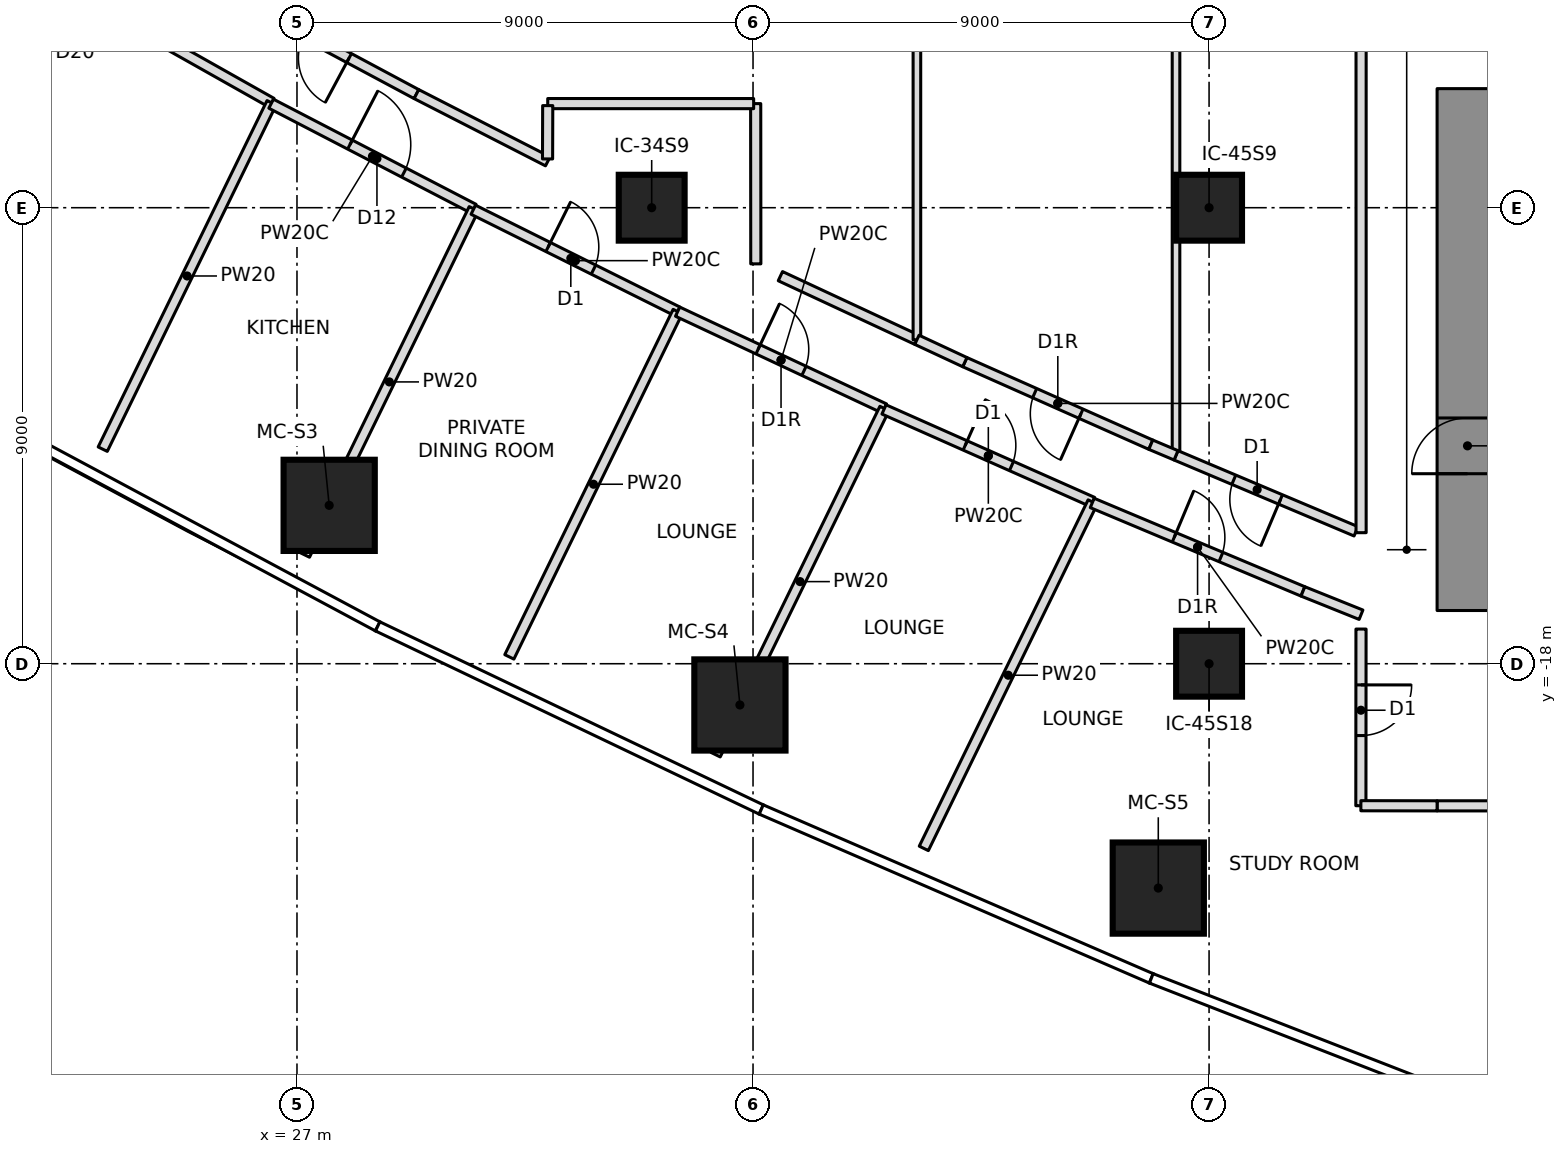
"""IFC4 building model, lengths in metres.
Left out: names, types, materials, properties, quantities, classifications, styles, units other than length and angle.
Written with IfcOpenShell. Run it as: python <this file> out.ifc"""

import sys

from ifc_helpers import new_model, si_unit, direction, frame, frame_2d, origin, origin_2d, place, context, subcontext, project, spatial, rectangle, extrude, element, fill, save


model = new_model("IFC4")
c1 = context("Model", 3, precision=1e-05, world=origin(), true_north=direction((0.0, 1.0)))
c2 = subcontext(c1, "Body", "Model", "MODEL_VIEW")
j1 = project(units=[si_unit("LENGTHUNIT", "METRE"), si_unit("PLANEANGLEUNIT", "RADIAN")], contexts=[c1])
p1 = place(None, origin())
s1 = spatial("IfcSite", under=j1, at=p1, CompositionType="ELEMENT")
p2 = place(p1, origin())
s2 = spatial("IfcBuilding", under=s1, at=p2, CompositionType="ELEMENT")
p3 = place(p2, frame((0.0, 0.0, 35.0)))
s3 = spatial("IfcBuildingStorey", under=s2, at=p3, CompositionType="ELEMENT", Elevation=35.0)
p4 = place(p3, frame((50.1, -16.95, 0.0), z_axis=(0.0, 0.0, 1.0), x_axis=(0.0, 1.0, 0.0)))
e1 = element("IfcWall", 1, at=p4, inside=s3, PredefinedType="SHEAR", context=c2, shape_type="SweptSolid", body=[
    extrude(rectangle(XDim=10.3, YDim=1.2, at=frame_2d((5.15, 0.0))), origin(), (0.0, 0.0, 1.0), 4.6),
])
p5 = place(p4, frame((2.7, 0.0, 0.0)))
e2 = element("IfcOpeningElement", 2, at=p5, cuts=e1, PredefinedType="OPENING", context=c2, shape_type="SweptSolid", body=[
    extrude(rectangle(XDim=1.1, YDim=2.1, at=frame_2d((0.55, 1.05))), frame((0.0, 0.61, 0.0), z_axis=(0.0, -1.0, 0.0), x_axis=(1.0, 0.0, 0.0)), (0.0, 0.0, 1.0), 1.22),
])
for number, where, z_axis, x_axis in (
    (3, (27.635, -14.874, 0.0), (0.0, 0.0, 1.0), (1.0, 0.0, 0.0)),
    (4, (35.741, -18.814, 0.0), (0.0, 0.0, 1.0), (1.0, 0.0, 0.0)),
    (5, (43.998, -22.428, 0.0), (0.0, 0.0, 1.0), (1.0, 0.0, 0.0)),
):
    element("IfcColumn", number, at=place(p3, frame(where, z_axis=z_axis, x_axis=x_axis)), inside=s3, PredefinedType="COLUMN", context=c2, shape_type="SweptSolid", body=[
        extrude(rectangle(XDim=1.8, YDim=1.8, at=origin_2d()), origin(), (0.0, 0.0, 1.0), 4.6),
    ])
for number, where, z_axis, x_axis in (
    (6, (34.0, -9.0, 0.0), (0.0, 0.0, 1.0), (1.0, 0.0, 0.0)),
    (7, (45.0, -18.0, 0.0), (0.0, 0.0, 1.0), (1.0, 0.0, 0.0)),
    (8, (45.0, -9.0, 0.0), (0.0, 0.0, 1.0), (1.0, 0.0, 0.0)),
):
    element("IfcColumn", number, at=place(p3, frame(where, z_axis=z_axis, x_axis=x_axis)), inside=s3, PredefinedType="COLUMN", context=c2, shape_type="SweptSolid", body=[
        extrude(rectangle(XDim=1.3, YDim=1.3, at=origin_2d()), origin(), (0.0, 0.0, 1.0), 4.6),
    ])
p6 = place(p3, frame((17.874, -2.068, 0.0), z_axis=(0.0, 0.0, 1.0), x_axis=(0.871165632804, -0.490989246544, 0.0)))
e9 = element("IfcWall", 9, at=p6, inside=s3, PredefinedType="PARTITIONING", context=c2, shape_type="SweptSolid", body=[
    extrude(rectangle(XDim=9.901, YDim=0.2, at=frame_2d((4.951, 0.0))), origin(), (0.0, 0.0, 1.0), 4.3),
])
p7 = place(p6, frame((4.451, 0.0, 0.0)))
e10 = element("IfcOpeningElement", 10, at=p7, cuts=e9, PredefinedType="OPENING", context=c2, shape_type="SweptSolid", body=[
    extrude(rectangle(XDim=2.0, YDim=2.4, at=frame_2d((1.0, 1.2))), frame((0.0, 0.11, 0.0), z_axis=(0.0, -1.0, 0.0), x_axis=(1.0, 0.0, 0.0)), (0.0, 0.0, 1.0), 0.22),
])
p8 = place(p3, frame((23.166, -13.766, 0.0), z_axis=(0.0, 0.0, 1.0), x_axis=(0.438215539964, 0.898869924146, 0.0)))
e11 = element("IfcWall", 11, at=p8, inside=s3, PredefinedType="PARTITIONING", context=c2, shape_type="SweptSolid", body=[
    extrude(rectangle(XDim=7.605, YDim=0.2, at=frame_2d((3.803, 0.0))), origin(), (0.0, 0.0, 1.0), 4.3),
])
p9 = place(p3, frame((26.49, -6.948, 0.0), z_axis=(0.0, 0.0, 1.0), x_axis=(0.887638836985, -0.460540220911, 0.0)))
e12 = element("IfcWall", 12, at=p9, inside=s3, PredefinedType="PARTITIONING", context=c2, shape_type="SweptSolid", body=[
    extrude(rectangle(XDim=4.504, YDim=0.2, at=frame_2d((2.252, 0.0))), origin(), (0.0, 0.0, 1.0), 4.3),
])
p10 = place(p9, frame((1.752, 0.0, 0.0)))
e13 = element("IfcOpeningElement", 13, at=p10, cuts=e12, PredefinedType="OPENING", context=c2, shape_type="SweptSolid", body=[
    extrude(rectangle(XDim=1.2, YDim=2.1, at=frame_2d((0.6, 1.05))), frame((0.0, 0.11, 0.0), z_axis=(0.0, -1.0, 0.0), x_axis=(1.0, 0.0, 0.0)), (0.0, 0.0, 1.0), 0.22),
])
p11 = place(p3, frame((27.157, -15.854, 0.0), z_axis=(0.0, 0.0, 1.0), x_axis=(0.43822365664, 0.898865967072, 0.0)))
e14 = element("IfcWall", 14, at=p11, inside=s3, PredefinedType="PARTITIONING", context=c2, shape_type="SweptSolid", body=[
    extrude(rectangle(XDim=7.601, YDim=0.2, at=frame_2d((3.801, 0.0))), origin(), (0.0, 0.0, 1.0), 4.3),
])
p12 = place(p3, frame((30.48, -9.04, 0.0), z_axis=(0.0, 0.0, 1.0), x_axis=(0.894989913054, -0.446086376761, 0.0)))
e15 = element("IfcWall", 15, at=p12, inside=s3, PredefinedType="PARTITIONING", context=c2, shape_type="SweptSolid", body=[
    extrude(rectangle(XDim=4.506, YDim=0.2, at=frame_2d((2.253, 0.0))), origin(), (0.0, 0.0, 1.0), 4.3),
])
p13 = place(p12, frame((1.65, 0.0, 0.0)))
e16 = element("IfcOpeningElement", 16, at=p13, cuts=e15, PredefinedType="OPENING", context=c2, shape_type="SweptSolid", body=[
    extrude(rectangle(XDim=1.0, YDim=2.1, at=frame_2d((0.5, 1.05))), frame((0.0, 0.11, 0.0), z_axis=(0.0, -1.0, 0.0), x_axis=(1.0, 0.0, 0.0)), (0.0, 0.0, 1.0), 0.22),
])
p14 = place(p3, frame((31.191, -17.865, 0.0), z_axis=(0.0, 0.0, 1.0), x_axis=(0.438187612283, 0.898883538865, 0.0)))
e17 = element("IfcWall", 17, at=p14, inside=s3, PredefinedType="PARTITIONING", context=c2, shape_type="SweptSolid", body=[
    extrude(rectangle(XDim=7.582, YDim=0.2, at=frame_2d((3.791, 0.0))), origin(), (0.0, 0.0, 1.0), 4.3),
])
p15 = place(p3, frame((34.512, -11.052, 0.0), z_axis=(0.0, 0.0, 1.0), x_axis=(0.905585758423, -0.424163216394, 0.0)))
e18 = element("IfcWall", 18, at=p15, inside=s3, PredefinedType="PARTITIONING", context=c2, shape_type="SweptSolid", body=[
    extrude(rectangle(XDim=4.507, YDim=0.2, at=frame_2d((2.253, 0.0))), origin(), (0.0, 0.0, 1.0), 4.3),
])
p16 = place(p15, frame((1.753, 0.0, 0.0)))
e19 = element("IfcOpeningElement", 19, at=p16, cuts=e18, PredefinedType="OPENING", context=c2, shape_type="SweptSolid", body=[
    extrude(rectangle(XDim=1.0, YDim=2.1, at=frame_2d((0.5, 1.05))), frame((0.0, 0.11, 0.0), z_axis=(0.0, -1.0, 0.0), x_axis=(1.0, 0.0, 0.0)), (0.0, 0.0, 1.0), 0.22),
])
p17 = place(p3, frame((35.263, -19.796, 0.0), z_axis=(0.0, 0.0, 1.0), x_axis=(0.438197705697, 0.898878618459, 0.0)))
e20 = element("IfcWall", 20, at=p17, inside=s3, PredefinedType="PARTITIONING", context=c2, shape_type="SweptSolid", body=[
    extrude(rectangle(XDim=7.601, YDim=0.2, at=frame_2d((3.801, 0.0))), origin(), (0.0, 0.0, 1.0), 4.3),
])
p18 = place(p3, frame((38.585, -12.981, 0.0), z_axis=(0.0, 0.0, 1.0), x_axis=(0.914010307464, -0.40569096348, 0.0)))
e21 = element("IfcWall", 21, at=p18, inside=s3, PredefinedType="PARTITIONING", context=c2, shape_type="SweptSolid", body=[
    extrude(rectangle(XDim=4.506, YDim=0.2, at=frame_2d((2.253, 0.0))), origin(), (0.0, 0.0, 1.0), 4.3),
])
p19 = place(p18, frame((1.753, 0.0, 0.0)))
e22 = element("IfcOpeningElement", 22, at=p19, cuts=e21, PredefinedType="OPENING", context=c2, shape_type="SweptSolid", body=[
    extrude(rectangle(XDim=1.0, YDim=2.1, at=frame_2d((0.5, 1.05))), frame((0.0, 0.11, 0.0), z_axis=(0.0, -1.0, 0.0), x_axis=(1.0, 0.0, 0.0)), (0.0, 0.0, 1.0), 0.22),
])
p20 = place(p3, frame((39.37, -21.645, 0.0), z_axis=(0.0, 0.0, 1.0), x_axis=(0.438202247191, 0.898876404494, 0.0)))
e23 = element("IfcWall", 23, at=p20, inside=s3, PredefinedType="PARTITIONING", context=c2, shape_type="SweptSolid", body=[
    extrude(rectangle(XDim=7.605, YDim=0.2, at=frame_2d((3.802, 0.0))), origin(), (0.0, 0.0, 1.0), 4.3),
])
p21 = place(p3, frame((42.694, -14.827, 0.0), z_axis=(0.0, 0.0, 1.0), x_axis=(0.922040468003, -0.38709349693, 0.0)))
e24 = element("IfcWall", 24, at=p21, inside=s3, PredefinedType="PARTITIONING", context=c2, shape_type="SweptSolid", body=[
    extrude(rectangle(XDim=4.51, YDim=0.2, at=frame_2d((2.255, 0.0))), origin(), (0.0, 0.0, 1.0), 4.3),
])
p22 = place(p21, frame((1.755, 0.0, 0.0)))
e25 = element("IfcOpeningElement", 25, at=p22, cuts=e24, PredefinedType="OPENING", context=c2, shape_type="SweptSolid", body=[
    extrude(rectangle(XDim=1.0, YDim=2.1, at=frame_2d((0.5, 1.05))), frame((0.0, 0.11, 0.0), z_axis=(0.0, -1.0, 0.0), x_axis=(1.0, 0.0, 0.0)), (0.0, 0.0, 1.0), 0.22),
])
p23 = place(p3, frame((29.357, -6.758, 0.0), z_axis=(0.0, 0.0, 1.0), x_axis=(-0.881655245922, 0.471894084874, 0.0)))
e26 = element("IfcWall", 26, at=p23, inside=s3, PredefinedType="PARTITIONING", context=c2, shape_type="SweptSolid", body=[
    extrude(rectangle(XDim=4.016, YDim=0.2, at=frame_2d((2.008, 0.0))), origin(), (0.0, 0.0, 1.0), 4.3),
])
p24 = place(p23, frame((1.508, 0.0, 0.0)))
e27 = element("IfcOpeningElement", 27, at=p24, cuts=e26, PredefinedType="OPENING", context=c2, shape_type="SweptSolid", body=[
    extrude(rectangle(XDim=1.0, YDim=2.1, at=frame_2d((0.5, 1.05))), frame((0.0, 0.11, 0.0), z_axis=(0.0, -1.0, 0.0), x_axis=(1.0, 0.0, 0.0)), (0.0, 0.0, 1.0), 0.22),
])
p25 = place(p3, frame((39.234, -11.607, 0.0), z_axis=(0.0, 0.0, 1.0), x_axis=(-0.90636141858, 0.422503229467, 0.0)))
e28 = element("IfcWall", 28, at=p25, inside=s3, PredefinedType="PARTITIONING", context=c2, shape_type="SweptSolid", body=[
    extrude(rectangle(XDim=2.972, YDim=0.2, at=frame_2d((1.486, 0.0))), origin(), (0.0, 0.0, 1.0), 4.3),
])
p26 = place(p3, frame((31.95, -8.085, 0.0), z_axis=(0.0, 0.0, 1.0), x_axis=(-0.890213377055, 0.455543788579, 0.0)))
e29 = element("IfcWall", 29, at=p26, inside=s3, PredefinedType="PARTITIONING", context=c2, shape_type="SweptSolid", body=[
    extrude(rectangle(XDim=2.912, YDim=0.2, at=frame_2d((1.456, 0.0))), origin(), (0.0, 0.0, 1.0), 4.3),
])
p27 = place(p3, frame((39.234, -11.607, 0.0), z_axis=(0.0, 0.0, 1.0), x_axis=(0.0, 1.0, 0.0)))
e30 = element("IfcWall", 30, at=p27, inside=s3, PredefinedType="PARTITIONING", context=c2, shape_type="SweptSolid", body=[
    extrude(rectangle(XDim=23.214, YDim=0.15, at=frame_2d((11.607, 0.0))), origin(), (0.0, 0.0, 1.0), 4.3),
])
p28 = place(p3, frame((43.85, -13.677, 0.0), z_axis=(0.0, 0.0, 1.0), x_axis=(-0.913986953061, 0.405743576209, 0.0)))
e31 = element("IfcWall", 31, at=p28, inside=s3, PredefinedType="PARTITIONING", context=c2, shape_type="SweptSolid", body=[
    extrude(rectangle(XDim=4.016, YDim=0.2, at=frame_2d((2.008, 0.0))), origin(), (0.0, 0.0, 1.0), 4.3),
])
p29 = place(p28, frame((1.508, 0.0, 0.0)))
e32 = element("IfcOpeningElement", 32, at=p29, cuts=e31, PredefinedType="OPENING", context=c2, shape_type="SweptSolid", body=[
    extrude(rectangle(XDim=1.0, YDim=2.1, at=frame_2d((0.5, 1.05))), frame((0.0, 0.11, 0.0), z_axis=(0.0, -1.0, 0.0), x_axis=(1.0, 0.0, 0.0)), (0.0, 0.0, 1.0), 0.22),
])
p30 = place(p3, frame((40.18, -12.048, 0.0), z_axis=(0.0, 0.0, 1.0), x_axis=(-0.906308643899, 0.422616424188, 0.0)))
e33 = element("IfcWall", 33, at=p30, inside=s3, PredefinedType="PARTITIONING", context=c2, shape_type="SweptSolid", body=[
    extrude(rectangle(XDim=1.043, YDim=0.2, at=frame_2d((0.521, 0.0))), origin(), (0.0, 0.0, 1.0), 4.3),
])
p31 = place(p3, frame((44.348, -13.887, 0.0), z_axis=(0.0, 0.0, 1.0), x_axis=(0.0, 1.0, 0.0)))
e34 = element("IfcWall", 34, at=p31, inside=s3, PredefinedType="PARTITIONING", context=c2, shape_type="SweptSolid", body=[
    extrude(rectangle(XDim=27.774, YDim=0.15, at=frame_2d((13.887, 0.0))), origin(), (0.0, 0.0, 1.0), 4.3),
])
p32 = place(p3, frame((47.9, -15.387, 0.0), z_axis=(0.0, 0.0, 1.0), x_axis=(-0.921257124206, 0.388954124673, 0.0)))
e35 = element("IfcWall", 35, at=p32, inside=s3, PredefinedType="PARTITIONING", context=c2, shape_type="SweptSolid", body=[
    extrude(rectangle(XDim=3.856, YDim=0.2, at=frame_2d((1.928, 0.0))), origin(), (0.0, 0.0, 1.0), 4.3),
])
p33 = place(p32, frame((1.618, 0.0, 0.0)))
e36 = element("IfcOpeningElement", 36, at=p33, cuts=e35, PredefinedType="OPENING", context=c2, shape_type="SweptSolid", body=[
    extrude(rectangle(XDim=1.0, YDim=2.1, at=frame_2d((0.5, 1.05))), frame((0.0, 0.11, 0.0), z_axis=(0.0, -1.0, 0.0), x_axis=(1.0, 0.0, 0.0)), (0.0, 0.0, 1.0), 0.22),
])
p34 = place(p3, frame((49.5, -20.805, 0.0), z_axis=(0.0, 0.0, 1.0), x_axis=(1.0, 0.0, 0.0)))
e37 = element("IfcWall", 37, at=p34, inside=s3, PredefinedType="PARTITIONING", context=c2, shape_type="SweptSolid", body=[
    extrude(rectangle(XDim=5.097, YDim=0.2, at=frame_2d((2.548, 0.0))), origin(), (0.0, 0.0, 1.0), 4.3),
])
p35 = place(p34, frame((2.048, 0.0, 0.0)))
e38 = element("IfcOpeningElement", 38, at=p35, cuts=e37, PredefinedType="OPENING", context=c2, shape_type="SweptSolid", body=[
    extrude(rectangle(XDim=1.5, YDim=2.1, at=frame_2d((0.75, 1.05))), frame((0.0, 0.11, 0.0), z_axis=(0.0, -1.0, 0.0), x_axis=(1.0, 0.0, 0.0)), (0.0, 0.0, 1.0), 0.22),
])
p36 = place(p3, frame((47.999, -17.316, 0.0), z_axis=(0.0, 0.0, 1.0), x_axis=(-0.000770200024, -0.999999703396, 0.0)))
e39 = element("IfcWall", 39, at=p36, inside=s3, PredefinedType="PARTITIONING", context=c2, shape_type="SweptSolid", body=[
    extrude(rectangle(XDim=3.487, YDim=0.2, at=frame_2d((1.743, 0.0))), origin(), (0.0, 0.0, 1.0), 4.3),
])
p37 = place(p36, frame((1.102, 0.0, 0.0)))
e40 = element("IfcOpeningElement", 40, at=p37, cuts=e39, PredefinedType="OPENING", context=c2, shape_type="SweptSolid", body=[
    extrude(rectangle(XDim=1.0, YDim=2.1, at=frame_2d((0.5, 1.05))), frame((0.0, 0.11, 0.0), z_axis=(0.0, -1.0, 0.0), x_axis=(1.0, 0.0, 0.0)), (0.0, 0.0, 1.0), 0.22),
])
p38 = place(p3, frame((36.055, -10.108, 0.0), z_axis=(0.0, 0.0, 1.0), x_axis=(-0.00077190251, 0.999999702083, 0.0)))
e41 = element("IfcWall", 41, at=p38, inside=s3, PredefinedType="PARTITIONING", context=c2, shape_type="SweptSolid", body=[
    extrude(rectangle(XDim=3.163, YDim=0.2, at=frame_2d((1.582, 0.0))), origin(), (0.0, 0.0, 1.0), 4.3),
])
p39 = place(p3, frame((36.012, -6.946, 0.0), z_axis=(0.0, 0.0, 1.0), x_axis=(-0.999999998196, 6.0074492e-05, 0.0)))
e42 = element("IfcWall", 42, at=p39, inside=s3, PredefinedType="PARTITIONING", context=c2, shape_type="SweptSolid", body=[
    extrude(rectangle(XDim=4.064, YDim=0.2, at=frame_2d((2.032, 0.0))), origin(), (0.0, 0.0, 1.0), 4.3),
])
p40 = place(p3, frame((31.948, -6.985, 0.0), z_axis=(0.0, 0.0, 1.0), x_axis=(-0.003248242724, -0.999994724446, 0.0)))
e43 = element("IfcWall", 43, at=p40, inside=s3, PredefinedType="PARTITIONING", context=c2, shape_type="SweptSolid", body=[
    extrude(rectangle(XDim=1.052, YDim=0.2, at=frame_2d((0.526, 0.0))), origin(), (0.0, 0.0, 1.0), 4.3),
])
p41 = place(p3, frame((48.0, 15.414, 0.0), z_axis=(0.0, 0.0, 1.0), x_axis=(0.0, -1.0, 0.0)))
e44 = element("IfcWall", 44, at=p41, inside=s3, PredefinedType="PARTITIONING", context=c2, shape_type="SweptSolid", body=[
    extrude(rectangle(XDim=30.828, YDim=0.2, at=frame_2d((15.414, 0.0))), origin(), (0.0, 0.0, 1.0), 4.3),
])
p42 = place(p3, frame((46.852, -16.573, 0.0), z_axis=(0.0, 0.0, 1.0), x_axis=(0.927985362933, -0.372616647752, 0.0)))
e45 = element("IfcWall", 45, at=p42, inside=s3, PredefinedType="PARTITIONING", context=c2, shape_type="SweptSolid", body=[
    extrude(rectangle(XDim=1.236, YDim=0.2, at=frame_2d((0.618, 0.0))), origin(), (0.0, 0.0, 1.0), 4.3),
])
p43 = place(p3, frame((47.996, -20.803, 0.0), z_axis=(0.0, 0.0, 1.0), x_axis=(0.999998933031, -0.001460800259, 0.0)))
e46 = element("IfcWall", 46, at=p43, inside=s3, PredefinedType="PARTITIONING", context=c2, shape_type="SweptSolid", body=[
    extrude(rectangle(XDim=1.504, YDim=0.2, at=frame_2d((0.752, 0.0))), origin(), (0.0, 0.0, 1.0), 4.3),
])
p44 = place(p3, frame((44.348, -13.887, 0.0), z_axis=(0.0, 0.0, 1.0), x_axis=(-0.921328740692, 0.388784453874, 0.0)))
e47 = element("IfcWall", 47, at=p44, inside=s3, PredefinedType="PARTITIONING", context=c2, shape_type="SweptSolid", body=[
    extrude(rectangle(XDim=0.54, YDim=0.2, at=frame_2d((0.27, 0.0))), origin(), (0.0, 0.0, 1.0), 4.3),
])
p45 = place(p10, origin())
e48 = element("IfcDoor", 48, at=p45, inside=s3, OperationType="SINGLE_SWING_RIGHT", PredefinedType="DOOR", context=c2, shape_type="SweptSolid", body=[
    extrude(rectangle(XDim=1.2, YDim=2.1, at=frame_2d((0.6, 1.05))), frame((0.0, 0.025, 0.0), z_axis=(0.0, -1.0, 0.0), x_axis=(1.0, 0.0, 0.0)), (0.0, 0.0, 1.0), 0.05),
])
fill(e13, e48)
p46 = place(p13, origin())
e49 = element("IfcDoor", 49, at=p46, inside=s3, OperationType="SINGLE_SWING_LEFT", PredefinedType="DOOR", context=c2, shape_type="SweptSolid", body=[
    extrude(rectangle(XDim=1.0, YDim=2.1, at=frame_2d((0.5, 1.05))), frame((0.0, 0.025, 0.0), z_axis=(0.0, -1.0, 0.0), x_axis=(1.0, 0.0, 0.0)), (0.0, 0.0, 1.0), 0.05),
])
fill(e16, e49)
p47 = place(p16, origin())
e50 = element("IfcDoor", 50, at=p47, inside=s3, OperationType="SINGLE_SWING_RIGHT", PredefinedType="DOOR", context=c2, shape_type="SweptSolid", body=[
    extrude(rectangle(XDim=1.0, YDim=2.1, at=frame_2d((0.5, 1.05))), frame((0.0, 0.025, 0.0), z_axis=(0.0, -1.0, 0.0), x_axis=(1.0, 0.0, 0.0)), (0.0, 0.0, 1.0), 0.05),
])
fill(e19, e50)
p48 = place(p19, origin())
e51 = element("IfcDoor", 51, at=p48, inside=s3, OperationType="SINGLE_SWING_LEFT", PredefinedType="DOOR", context=c2, shape_type="SweptSolid", body=[
    extrude(rectangle(XDim=1.0, YDim=2.1, at=frame_2d((0.5, 1.05))), frame((0.0, 0.025, 0.0), z_axis=(0.0, -1.0, 0.0), x_axis=(1.0, 0.0, 0.0)), (0.0, 0.0, 1.0), 0.05),
])
fill(e22, e51)
p49 = place(p22, origin())
e52 = element("IfcDoor", 52, at=p49, inside=s3, OperationType="SINGLE_SWING_RIGHT", PredefinedType="DOOR", context=c2, shape_type="SweptSolid", body=[
    extrude(rectangle(XDim=1.0, YDim=2.1, at=frame_2d((0.5, 1.05))), frame((0.0, 0.025, 0.0), z_axis=(0.0, -1.0, 0.0), x_axis=(1.0, 0.0, 0.0)), (0.0, 0.0, 1.0), 0.05),
])
fill(e25, e52)
p50 = place(p24, origin())
e53 = element("IfcDoor", 53, at=p50, inside=s3, OperationType="SINGLE_SWING_LEFT", PredefinedType="DOOR", context=c2, shape_type="SweptSolid", body=[
    extrude(rectangle(XDim=1.0, YDim=2.1, at=frame_2d((0.5, 1.05))), frame((0.0, 0.025, 0.0), z_axis=(0.0, -1.0, 0.0), x_axis=(1.0, 0.0, 0.0)), (0.0, 0.0, 1.0), 0.05),
])
fill(e27, e53)
p51 = place(p29, origin())
e54 = element("IfcDoor", 54, at=p51, inside=s3, OperationType="SINGLE_SWING_RIGHT", PredefinedType="DOOR", context=c2, shape_type="SweptSolid", body=[
    extrude(rectangle(XDim=1.0, YDim=2.1, at=frame_2d((0.5, 1.05))), frame((0.0, 0.025, 0.0), z_axis=(0.0, -1.0, 0.0), x_axis=(1.0, 0.0, 0.0)), (0.0, 0.0, 1.0), 0.05),
])
fill(e32, e54)
p52 = place(p33, origin())
e55 = element("IfcDoor", 55, at=p52, inside=s3, OperationType="SINGLE_SWING_LEFT", PredefinedType="DOOR", context=c2, shape_type="SweptSolid", body=[
    extrude(rectangle(XDim=1.0, YDim=2.1, at=frame_2d((0.5, 1.05))), frame((0.0, 0.025, 0.0), z_axis=(0.0, -1.0, 0.0), x_axis=(1.0, 0.0, 0.0)), (0.0, 0.0, 1.0), 0.05),
])
fill(e36, e55)
p53 = place(p37, origin())
e56 = element("IfcDoor", 56, at=p53, inside=s3, OperationType="SINGLE_SWING_LEFT", PredefinedType="DOOR", context=c2, shape_type="SweptSolid", body=[
    extrude(rectangle(XDim=1.0, YDim=2.1, at=frame_2d((0.5, 1.05))), frame((0.0, 0.025, 0.0), z_axis=(0.0, -1.0, 0.0), x_axis=(1.0, 0.0, 0.0)), (0.0, 0.0, 1.0), 0.05),
])
fill(e40, e56)
p54 = place(p5, origin())
e57 = element("IfcDoor", 57, at=p54, inside=s3, OperationType="SINGLE_SWING_RIGHT", PredefinedType="DOOR", context=c2, shape_type="SweptSolid", body=[
    extrude(rectangle(XDim=1.1, YDim=2.1, at=frame_2d((0.55, 1.05))), frame((0.0, 0.025, 0.0), z_axis=(0.0, -1.0, 0.0), x_axis=(1.0, 0.0, 0.0)), (0.0, 0.0, 1.0), 0.05),
])
fill(e2, e57)
save(model, sys.argv[1])
